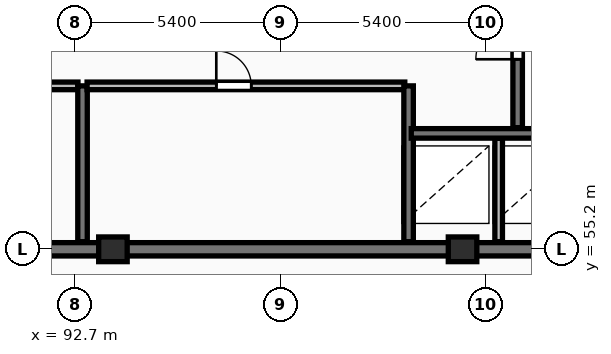
"""IFC4 building model, lengths in metres.
Left out: names, types, materials, properties, quantities, classifications, styles, units other than length and angle.
Written with IfcOpenShell. Run it as: python <this file> out.ifc"""

import sys

from ifc_helpers import new_model, si_unit, direction, frame, frame_2d, origin, origin_2d, place, context, subcontext, project, spatial, rectangle, extrude, element, fill, save


model = new_model("IFC4")
c1 = context("Model", 3, precision=1e-05, world=origin(), true_north=direction((0.0, 1.0)))
c2 = subcontext(c1, "Body", "Model", "MODEL_VIEW")
j1 = project(units=[si_unit("LENGTHUNIT", "METRE"), si_unit("PLANEANGLEUNIT", "RADIAN")], contexts=[c1])
p1 = place(None, origin())
s1 = spatial("IfcSite", under=j1, at=p1, CompositionType="ELEMENT")
p2 = place(p1, origin())
s2 = spatial("IfcBuilding", under=s1, at=p2, CompositionType="ELEMENT")
p3 = place(p2, frame((0.0, 0.0, 259.7)))
s3 = spatial("IfcBuildingStorey", under=s2, at=p3, CompositionType="ELEMENT", Elevation=259.7)
for number, where, z_axis, x_axis in (
    (1, (93.7, 55.2, 0.0), (0.0, 0.0, 1.0), (1.0, 0.0, 0.0)),
    (2, (102.9, 55.2, 0.0), (0.0, 0.0, 1.0), (1.0, 0.0, 0.0)),
):
    element("IfcColumn", number, at=place(p3, frame(where, z_axis=z_axis, x_axis=x_axis)), inside=s3, PredefinedType="COLUMN", context=c2, shape_type="SweptSolid", body=[
        extrude(rectangle(XDim=0.75, YDim=0.65, at=origin_2d()), origin(), (0.0, 0.0, 1.0), 4.5),
    ])
p4 = place(p3, frame((75.95, 55.2, 0.0), z_axis=(0.0, 0.0, 1.0), x_axis=(1.0, 0.0, 0.0)))
e3 = element("IfcWall", 3, at=p4, inside=s3, PredefinedType="SHEAR", context=c2, shape_type="SweptSolid", body=[
    extrude(rectangle(XDim=36.3, YDim=0.35, at=frame_2d((18.15, 0.0))), origin(), (0.0, 0.0, 1.0), 4.5),
])
p5 = place(p3, frame((84.42, 59.5, 0.0), z_axis=(0.0, 0.0, 1.0), x_axis=(1.0, 0.0, 0.0)))
e4 = element("IfcWall", 4, at=p5, inside=s3, PredefinedType="PARTITIONING", context=c2, shape_type="SweptSolid", body=[
    extrude(rectangle(XDim=8.36, YDim=0.2, at=frame_2d((4.18, 0.0))), origin(), (0.0, 0.0, 1.0), 4.23),
])
p6 = place(p5, frame((3.4, 0.0, 0.0)))
e5 = element("IfcOpeningElement", 5, at=p6, cuts=e4, PredefinedType="OPENING", context=c2, shape_type="SweptSolid", body=[
    extrude(rectangle(XDim=0.92, YDim=2.08, at=frame_2d((0.46, 1.04))), frame((0.0, 0.11, 0.0), z_axis=(0.0, -1.0, 0.0), x_axis=(1.0, 0.0, 0.0)), (0.0, 0.0, 1.0), 0.22),
])
p7 = place(p3, frame((92.9, 55.4, 0.0), z_axis=(0.0, 0.0, 1.0), x_axis=(0.0, 1.0, 0.0)))
e6 = element("IfcWall", 6, at=p7, inside=s3, PredefinedType="SHEAR", context=c2, shape_type="SweptSolid", body=[
    extrude(rectangle(XDim=4.1, YDim=0.25, at=frame_2d((2.05, 0.0))), origin(), (0.0, 0.0, 1.0), 4.5),
])
p8 = place(p3, frame((93.02, 59.5, 0.0), z_axis=(0.0, 0.0, 1.0), x_axis=(1.0, 0.0, 0.0)))
e7 = element("IfcWall", 7, at=p8, inside=s3, PredefinedType="PARTITIONING", context=c2, shape_type="SweptSolid", body=[
    extrude(rectangle(XDim=8.36, YDim=0.2, at=frame_2d((4.18, 0.0))), origin(), (0.0, 0.0, 1.0), 4.23),
])
p9 = place(p8, frame((3.4, 0.0, 0.0)))
e8 = element("IfcOpeningElement", 8, at=p9, cuts=e7, PredefinedType="OPENING", context=c2, shape_type="SweptSolid", body=[
    extrude(rectangle(XDim=0.92, YDim=2.08, at=frame_2d((0.46, 1.04))), frame((0.0, 0.11, 0.0), z_axis=(0.0, -1.0, 0.0), x_axis=(1.0, 0.0, 0.0)), (0.0, 0.0, 1.0), 0.22),
])
p10 = place(p3, frame((101.48, 55.4, 0.0), z_axis=(0.0, 0.0, 1.0), x_axis=(0.0, 1.0, 0.0)))
e9 = element("IfcWall", 9, at=p10, inside=s3, PredefinedType="SHEAR", context=c2, shape_type="SweptSolid", body=[
    extrude(rectangle(XDim=4.1, YDim=0.25, at=frame_2d((2.05, 0.0))), origin(), (0.0, 0.0, 1.0), 4.5),
])
p11 = place(p3, frame((103.85, 55.4, 0.0), z_axis=(0.0, 0.0, 1.0), x_axis=(0.0, 1.0, 0.0)))
e10 = element("IfcWall", 10, at=p11, inside=s3, PredefinedType="PARTITIONING", context=c2, shape_type="SweptSolid", body=[
    extrude(rectangle(XDim=2.72, YDim=0.2, at=frame_2d((1.36, 0.0))), origin(), (0.0, 0.0, 1.0), 4.23),
])
p12 = place(p3, frame((101.55, 58.25, 0.0), z_axis=(0.0, 0.0, 1.0), x_axis=(1.0, 0.0, 0.0)))
e11 = element("IfcWall", 11, at=p12, inside=s3, PredefinedType="SHEAR", context=c2, shape_type="SweptSolid", body=[
    extrude(rectangle(XDim=4.6, YDim=0.25, at=frame_2d((2.3, 0.0))), origin(), (0.0, 0.0, 1.0), 4.5),
])
p13 = place(p3, frame((104.35, 58.4, 0.0), z_axis=(0.0, 0.0, 1.0), x_axis=(0.0, 1.0, 0.0)))
e12 = element("IfcWall", 12, at=p13, inside=s3, PredefinedType="SHEAR", context=c2, shape_type="SweptSolid", body=[
    extrude(rectangle(XDim=8.6, YDim=0.25, at=frame_2d((4.3, 0.0))), origin(), (0.0, 0.0, 1.0), 4.5),
])
p14 = place(p13, frame((1.8, 0.0, 0.0)))
e13 = element("IfcOpeningElement", 13, at=p14, cuts=e12, PredefinedType="OPENING", context=c2, shape_type="SweptSolid", body=[
    extrude(rectangle(XDim=1.1, YDim=2.1, at=frame_2d((0.55, 1.05))), frame((0.0, 0.135, 0.0), z_axis=(0.0, -1.0, 0.0), x_axis=(1.0, 0.0, 0.0)), (0.0, 0.0, 1.0), 0.27),
])
p15 = place(p9, origin())
e14 = element("IfcDoor", 14, at=p15, inside=s3, OperationType="SINGLE_SWING_LEFT", PredefinedType="DOOR", context=c2, shape_type="SweptSolid", body=[
    extrude(rectangle(XDim=0.92, YDim=2.08, at=frame_2d((0.46, 1.04))), frame((0.0, 0.025, 0.0), z_axis=(0.0, -1.0, 0.0), x_axis=(1.0, 0.0, 0.0)), (0.0, 0.0, 1.0), 0.05),
])
fill(e8, e14)
p16 = place(p14, origin())
e15 = element("IfcDoor", 15, at=p16, inside=s3, OperationType="SINGLE_SWING_LEFT", PredefinedType="DOOR", context=c2, shape_type="SweptSolid", body=[
    extrude(rectangle(XDim=1.1, YDim=2.1, at=frame_2d((0.55, 1.05))), frame((0.0, 0.025, 0.0), z_axis=(0.0, -1.0, 0.0), x_axis=(1.0, 0.0, 0.0)), (0.0, 0.0, 1.0), 0.05),
])
fill(e13, e15)
save(model, sys.argv[1])
